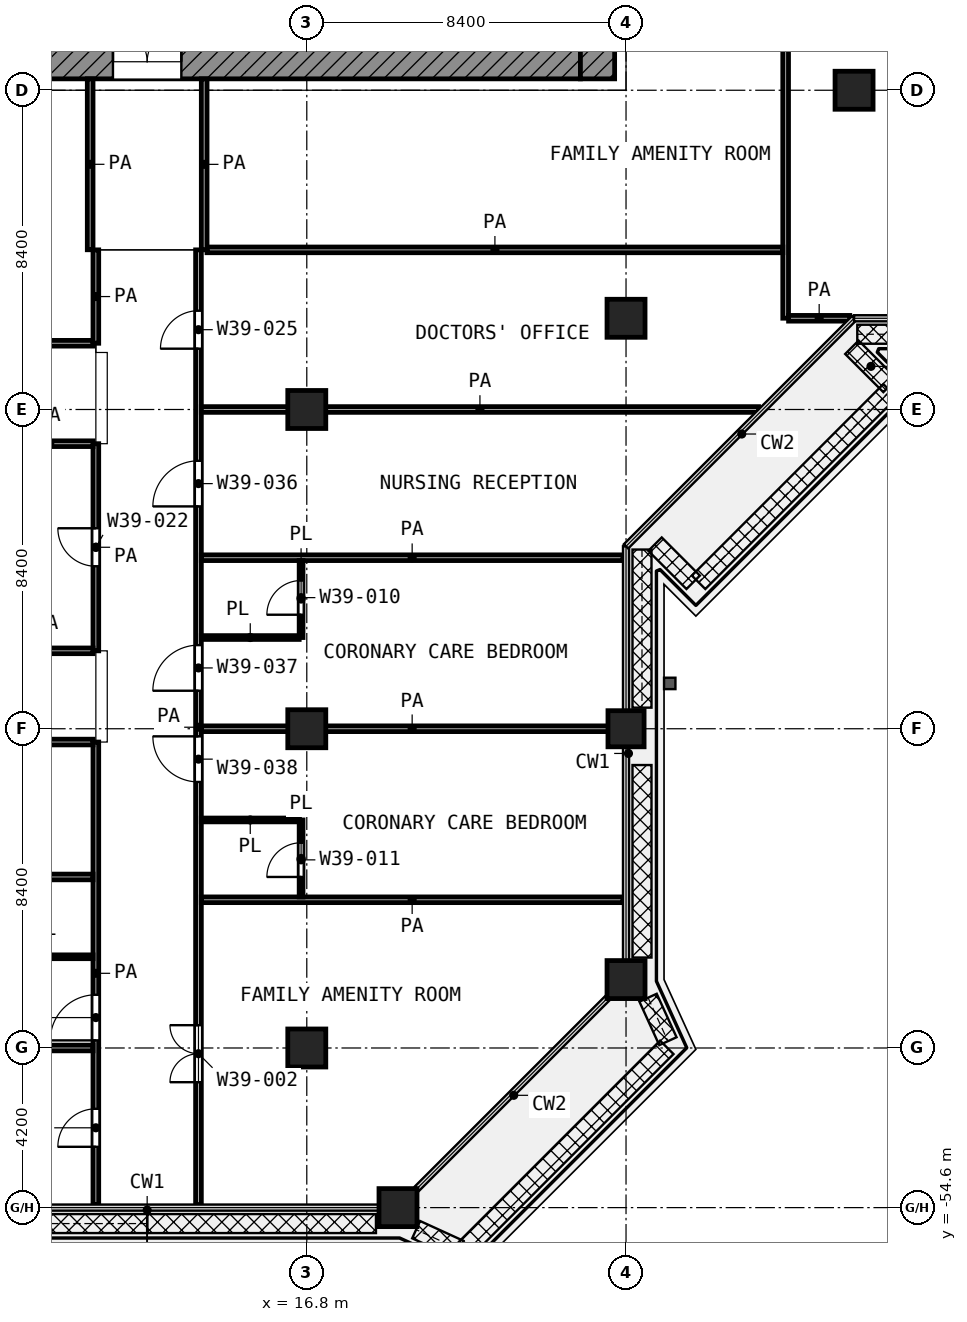
"""IFC4 building model, lengths in metres.
Left out: names, types, materials, properties, quantities, classifications, styles, units other than length and angle.
Written with IfcOpenShell. Run it as: python <this file> out.ifc"""

import sys

from ifc_helpers import new_model, si_unit, direction, frame, frame_2d, origin, origin_2d, place, context, subcontext, project, spatial, rectangle, extrude, element, fill, save


model = new_model("IFC4")
c1 = context("Model", 3, precision=1e-05, world=origin(), true_north=direction((0.0, 1.0)))
c2 = subcontext(c1, "Body", "Model", "MODEL_VIEW")
j1 = project(units=[si_unit("LENGTHUNIT", "METRE"), si_unit("PLANEANGLEUNIT", "RADIAN")], contexts=[c1])
p1 = place(None, origin())
s1 = spatial("IfcSite", under=j1, at=p1, CompositionType="ELEMENT")
p2 = place(p1, origin())
s2 = spatial("IfcBuilding", under=s1, at=p2, CompositionType="ELEMENT")
p3 = place(p2, frame((0.0, 0.0, 192.0)))
s3 = spatial("IfcBuildingStorey", under=s2, at=p3, CompositionType="ELEMENT", Elevation=192.0)
for number, where, z_axis, x_axis in (
    (1, (31.2, -25.2, 0.0), (0.0, 0.0, 1.0), (1.0, 0.0, 0.0)),
    (2, (25.2, -31.2, 0.0), (0.0, 0.0, 1.0), (1.0, 0.0, 0.0)),
    (3, (16.8, -33.6, 0.0), (0.0, 0.0, 1.0), (1.0, 0.0, 0.0)),
    (4, (16.8, -42.0, 0.0), (0.0, 0.0, 1.0), (1.0, 0.0, 0.0)),
):
    element("IfcColumn", number, at=place(p3, frame(where, z_axis=z_axis, x_axis=x_axis)), inside=s3, PredefinedType="COLUMN", context=c2, shape_type="SweptSolid", body=[
        extrude(rectangle(XDim=1.0, YDim=1.0, at=origin_2d()), origin(), (0.0, 0.0, 1.0), 4.2),
    ])
p4 = place(p3, frame((25.2, -42.0, 0.0), z_axis=(0.0, 0.0, 1.0), x_axis=(1.0, 0.0, 0.0)))
e5 = element("IfcColumn", 5, at=p4, inside=s3, PredefinedType="COLUMN", context=c2, shape_type="SweptSolid", body=[
    extrude(rectangle(XDim=0.95, YDim=0.95, at=origin_2d()), origin(), (0.0, 0.0, 1.0), 4.2),
])
for number, where, z_axis, x_axis in (
    (6, (25.2, -48.6, 0.0), (0.0, 0.0, 1.0), (1.0, 0.0, 0.0)),
    (7, (16.8, -50.4, 0.0), (0.0, 0.0, 1.0), (1.0, 0.0, 0.0)),
    (8, (19.2, -54.6, 0.0), (0.0, 0.0, 1.0), (1.0, 0.0, 0.0)),
):
    element("IfcColumn", number, at=place(p3, frame(where, z_axis=z_axis, x_axis=x_axis)), inside=s3, PredefinedType="COLUMN", context=c2, shape_type="SweptSolid", body=[
        extrude(rectangle(XDim=1.0, YDim=1.0, at=origin_2d()), origin(), (0.0, 0.0, 1.0), 4.2),
    ])
p5 = place(p3, frame((5.4, -24.45, 0.0), z_axis=(0.0, 0.0, 1.0), x_axis=(1.0, 0.0, 0.0)))
e9 = element("IfcWall", 9, at=p5, inside=s3, PredefinedType="SHEAR", context=c2, shape_type="SweptSolid", body=[
    extrude(rectangle(XDim=18.6, YDim=0.9, at=frame_2d((9.3, 0.0))), origin(), (0.0, 0.0, 1.0), 3.6),
])
p6 = place(p5, frame((6.3, 0.0, 0.0)))
e10 = element("IfcOpeningElement", 10, at=p6, cuts=e9, PredefinedType="OPENING", context=c2, shape_type="SweptSolid", body=[
    extrude(rectangle(XDim=1.8, YDim=2.1, at=frame_2d((0.9, 1.05))), frame((0.0, 0.46, 0.0), z_axis=(0.0, -1.0, 0.0), x_axis=(1.0, 0.0, 0.0)), (0.0, 0.0, 1.0), 0.92),
])
p7 = place(p3, frame((24.45, -24.9, 0.0), z_axis=(0.0, 0.0, 1.0), x_axis=(0.0, 1.0, 0.0)))
e11 = element("IfcWall", 11, at=p7, inside=s3, PredefinedType="SHEAR", context=c2, shape_type="SweptSolid", body=[
    extrude(rectangle(XDim=0.9, YDim=0.9, at=frame_2d((0.45, 0.0))), origin(), (0.0, 0.0, 1.0), 3.6),
])
p8 = place(p3, frame((8.6, -48.0, 0.0), z_axis=(0.0, 0.0, 1.0), x_axis=(1.0, 0.0, 0.0)))
e12 = element("IfcWall", 12, at=p8, inside=s3, PredefinedType="PARTITIONING", context=c2, shape_type="SweptSolid", body=[
    extrude(rectangle(XDim=2.575, YDim=0.1, at=frame_2d((1.288, 0.0))), origin(), (0.0, 0.0, 1.0), 3.6),
])
for number, where, z_axis, x_axis in (
    (13, (14.025, -44.4, 0.0), (0.0, 0.0, 1.0), (1.0, 0.0, 0.0)),
    (14, (14.025, -39.6, 0.0), (0.0, 0.0, 1.0), (1.0, 0.0, 0.0)),
):
    element("IfcWall", number, at=place(p3, frame(where, z_axis=z_axis, x_axis=x_axis)), inside=s3, PredefinedType="PARTITIONING", context=c2, shape_type="SweptSolid", body=[
        extrude(rectangle(XDim=2.575, YDim=0.1, at=frame_2d((1.288, 0.0))), origin(), (0.0, 0.0, 1.0), 3.6),
    ])
p9 = place(p3, frame((16.65, -46.425, 0.0), z_axis=(0.0, 0.0, 1.0), x_axis=(0.0, 1.0, 0.0)))
e15 = element("IfcWall", 15, at=p9, inside=s3, PredefinedType="PARTITIONING", context=c2, shape_type="SweptSolid", body=[
    extrude(rectangle(XDim=2.025, YDim=0.1, at=frame_2d((1.013, 0.0))), origin(), (0.0, 0.0, 1.0), 3.6),
])
p10 = place(p9, frame((0.525, 0.0, 0.0)))
e16 = element("IfcOpeningElement", 16, at=p10, cuts=e15, PredefinedType="OPENING", context=c2, shape_type="SweptSolid", body=[
    extrude(rectangle(XDim=0.9, YDim=2.1, at=frame_2d((0.45, 1.05))), frame((0.0, 0.06, 0.0), z_axis=(0.0, -1.0, 0.0), x_axis=(1.0, 0.0, 0.0)), (0.0, 0.0, 1.0), 0.12),
])
p11 = place(p3, frame((16.65, -39.6, 0.0), z_axis=(0.0, 0.0, 1.0), x_axis=(0.0, 1.0, 0.0)))
e17 = element("IfcWall", 17, at=p11, inside=s3, PredefinedType="PARTITIONING", context=c2, shape_type="SweptSolid", body=[
    extrude(rectangle(XDim=2.025, YDim=0.1, at=frame_2d((1.013, 0.0))), origin(), (0.0, 0.0, 1.0), 3.6),
])
p12 = place(p11, frame((0.6, 0.0, 0.0)))
e18 = element("IfcOpeningElement", 18, at=p12, cuts=e17, PredefinedType="OPENING", context=c2, shape_type="SweptSolid", body=[
    extrude(rectangle(XDim=0.9, YDim=2.1, at=frame_2d((0.45, 1.05))), frame((0.0, 0.06, 0.0), z_axis=(0.0, -1.0, 0.0), x_axis=(1.0, 0.0, 0.0)), (0.0, 0.0, 1.0), 0.12),
])
p13 = place(p3, frame((1.913, -50.4, 0.0), z_axis=(0.0, 0.0, 1.0), x_axis=(1.0, 0.0, 0.0)))
e19 = element("IfcWall", 19, at=p13, inside=s3, PredefinedType="PARTITIONING", context=c2, shape_type="SweptSolid", body=[
    extrude(rectangle(XDim=9.262, YDim=0.15, at=frame_2d((4.631, 0.0))), origin(), (0.0, 0.0, 1.0), 3.6),
])
p14 = place(p3, frame((14.025, -46.5, 0.0), z_axis=(0.0, 0.0, 1.0), x_axis=(1.0, 0.0, 0.0)))
e20 = element("IfcWall", 20, at=p14, inside=s3, PredefinedType="PARTITIONING", context=c2, shape_type="SweptSolid", body=[
    extrude(rectangle(XDim=11.095, YDim=0.15, at=frame_2d((5.548, 0.0))), origin(), (0.0, 0.0, 1.0), 3.6),
])
p15 = place(p3, frame((0.08, -45.9, 0.0), z_axis=(0.0, 0.0, 1.0), x_axis=(1.0, 0.0, 0.0)))
e21 = element("IfcWall", 21, at=p15, inside=s3, PredefinedType="PARTITIONING", context=c2, shape_type="SweptSolid", body=[
    extrude(rectangle(XDim=11.095, YDim=0.15, at=frame_2d((5.547, 0.0))), origin(), (0.0, 0.0, 1.0), 3.6),
])
p16 = place(p3, frame((2.327, -42.35, 0.0), z_axis=(0.0, 0.0, 1.0), x_axis=(1.0, 0.0, 0.0)))
e22 = element("IfcWall", 22, at=p16, inside=s3, PredefinedType="PARTITIONING", context=c2, shape_type="SweptSolid", body=[
    extrude(rectangle(XDim=8.848, YDim=0.15, at=frame_2d((4.424, 0.0))), origin(), (0.0, 0.0, 1.0), 3.6),
])
p17 = place(p16, frame((3.924, 0.0, 0.0)))
e23 = element("IfcOpeningElement", 23, at=p17, cuts=e22, PredefinedType="OPENING", context=c2, shape_type="SweptSolid", body=[
    extrude(rectangle(XDim=1.0, YDim=2.1, at=frame_2d((0.5, 1.05))), frame((0.0, 0.085, 0.0), z_axis=(0.0, -1.0, 0.0), x_axis=(1.0, 0.0, 0.0)), (0.0, 0.0, 1.0), 0.17),
])
p18 = place(p3, frame((14.025, -42.0, 0.0), z_axis=(0.0, 0.0, 1.0), x_axis=(1.0, 0.0, 0.0)))
e24 = element("IfcWall", 24, at=p18, inside=s3, PredefinedType="PARTITIONING", context=c2, shape_type="SweptSolid", body=[
    extrude(rectangle(XDim=11.095, YDim=0.15, at=frame_2d((5.548, 0.0))), origin(), (0.0, 0.0, 1.0), 3.6),
])
p19 = place(p3, frame((8.73, -39.95, 0.0), z_axis=(0.0, 0.0, 1.0), x_axis=(1.0, 0.0, 0.0)))
e25 = element("IfcWall", 25, at=p19, inside=s3, PredefinedType="PARTITIONING", context=c2, shape_type="SweptSolid", body=[
    extrude(rectangle(XDim=2.445, YDim=0.15, at=frame_2d((1.223, 0.0))), origin(), (0.0, 0.0, 1.0), 3.6),
])
p20 = place(p3, frame((14.025, -37.5, 0.0), z_axis=(0.0, 0.0, 1.0), x_axis=(1.0, 0.0, 0.0)))
e26 = element("IfcWall", 26, at=p20, inside=s3, PredefinedType="PARTITIONING", context=c2, shape_type="SweptSolid", body=[
    extrude(rectangle(XDim=11.095, YDim=0.15, at=frame_2d((5.548, 0.0))), origin(), (0.0, 0.0, 1.0), 3.6),
])
p21 = place(p3, frame((8.9, -34.5, 0.0), z_axis=(0.0, 0.0, 1.0), x_axis=(1.0, 0.0, 0.0)))
e27 = element("IfcWall", 27, at=p21, inside=s3, PredefinedType="PARTITIONING", context=c2, shape_type="SweptSolid", body=[
    extrude(rectangle(XDim=2.275, YDim=0.15, at=frame_2d((1.138, 0.0))), origin(), (0.0, 0.0, 1.0), 3.6),
])
p22 = place(p3, frame((14.025, -33.6, 0.0), z_axis=(0.0, 0.0, 1.0), x_axis=(1.0, 0.0, 0.0)))
e28 = element("IfcWall", 28, at=p22, inside=s3, PredefinedType="PARTITIONING", context=c2, shape_type="SweptSolid", body=[
    extrude(rectangle(XDim=14.662, YDim=0.15, at=frame_2d((7.331, 0.0))), origin(), (0.0, 0.0, 1.0), 3.6),
])
p23 = place(p3, frame((1.077, -31.857, 0.0), z_axis=(0.0, 0.0, 1.0), x_axis=(1.0, 0.0, 0.0)))
e29 = element("IfcWall", 29, at=p23, inside=s3, PredefinedType="PARTITIONING", context=c2, shape_type="SweptSolid", body=[
    extrude(rectangle(XDim=10.098, YDim=0.15, at=frame_2d((5.049, 0.0))), origin(), (0.0, 0.0, 1.0), 3.6),
])
p24 = place(p23, frame((4.449, 0.0, 0.0)))
e30 = element("IfcOpeningElement", 30, at=p24, cuts=e29, PredefinedType="OPENING", context=c2, shape_type="SweptSolid", body=[
    extrude(rectangle(XDim=1.2, YDim=2.1, at=frame_2d((0.6, 1.05))), frame((0.0, 0.085, 0.0), z_axis=(0.0, -1.0, 0.0), x_axis=(1.0, 0.0, 0.0)), (0.0, 0.0, 1.0), 0.17),
])
p25 = place(p3, frame((29.477, -31.2, 0.0), z_axis=(0.0, 0.0, 1.0), x_axis=(1.0, 0.0, 0.0)))
e31 = element("IfcWall", 31, at=p25, inside=s3, PredefinedType="PARTITIONING", context=c2, shape_type="SweptSolid", body=[
    extrude(rectangle(XDim=1.61, YDim=0.15, at=frame_2d((0.805, 0.0))), origin(), (0.0, 0.0, 1.0), 3.6),
])
p26 = place(p3, frame((14.175, -29.4, 0.0), z_axis=(0.0, 0.0, 1.0), x_axis=(1.0, 0.0, 0.0)))
e32 = element("IfcWall", 32, at=p26, inside=s3, PredefinedType="PARTITIONING", context=c2, shape_type="SweptSolid", body=[
    extrude(rectangle(XDim=15.15, YDim=0.15, at=frame_2d((7.575, 0.0))), origin(), (0.0, 0.0, 1.0), 3.6),
])
p27 = place(p3, frame((11.1, -29.397, 0.0), z_axis=(0.0, 0.0, 1.0), x_axis=(0.0, 1.0, 0.0)))
e33 = element("IfcWall", 33, at=p27, inside=s3, PredefinedType="PARTITIONING", context=c2, shape_type="SweptSolid", body=[
    extrude(rectangle(XDim=4.497, YDim=0.15, at=frame_2d((2.249, 0.0))), origin(), (0.0, 0.0, 1.0), 3.6),
])
p28 = place(p3, frame((11.25, -54.52, 0.0), z_axis=(0.0, 0.0, 1.0), x_axis=(0.0, 1.0, 0.0)))
e34 = element("IfcWall", 34, at=p28, inside=s3, PredefinedType="PARTITIONING", context=c2, shape_type="SweptSolid", body=[
    extrude(rectangle(XDim=12.17, YDim=0.15, at=frame_2d((6.085, 0.0))), origin(), (0.0, 0.0, 1.0), 3.6),
])
p29 = place(p28, frame((4.32, 0.0, 0.0)))
e35 = element("IfcOpeningElement", 35, at=p29, cuts=e34, PredefinedType="OPENING", context=c2, shape_type="SweptSolid", body=[
    extrude(rectangle(XDim=1.2, YDim=2.1, at=frame_2d((0.6, 1.05))), frame((0.0, 0.085, 0.0), z_axis=(0.0, -1.0, 0.0), x_axis=(1.0, 0.0, 0.0)), (0.0, 0.0, 1.0), 0.17),
])
p30 = place(p28, frame((1.52, 0.0, 0.0)))
e36 = element("IfcOpeningElement", 36, at=p30, cuts=e34, PredefinedType="OPENING", context=c2, shape_type="SweptSolid", body=[
    extrude(rectangle(XDim=1.0, YDim=2.1, at=frame_2d((0.5, 1.05))), frame((0.0, 0.085, 0.0), z_axis=(0.0, -1.0, 0.0), x_axis=(1.0, 0.0, 0.0)), (0.0, 0.0, 1.0), 0.17),
])
p31 = place(p3, frame((11.25, -39.95, 0.0), z_axis=(0.0, 0.0, 1.0), x_axis=(0.0, 1.0, 0.0)))
e37 = element("IfcWall", 37, at=p31, inside=s3, PredefinedType="PARTITIONING", context=c2, shape_type="SweptSolid", body=[
    extrude(rectangle(XDim=5.45, YDim=0.15, at=frame_2d((2.725, 0.0))), origin(), (0.0, 0.0, 1.0), 3.6),
])
p32 = place(p31, frame((2.225, 0.0, 0.0)))
e38 = element("IfcOpeningElement", 38, at=p32, cuts=e37, PredefinedType="OPENING", context=c2, shape_type="SweptSolid", body=[
    extrude(rectangle(XDim=1.0, YDim=2.1, at=frame_2d((0.5, 1.05))), frame((0.0, 0.085, 0.0), z_axis=(0.0, -1.0, 0.0), x_axis=(1.0, 0.0, 0.0)), (0.0, 0.0, 1.0), 0.17),
])
p33 = place(p3, frame((11.25, -31.857, 0.0), z_axis=(0.0, 0.0, 1.0), x_axis=(0.0, 1.0, 0.0)))
e39 = element("IfcWall", 39, at=p33, inside=s3, PredefinedType="PARTITIONING", context=c2, shape_type="SweptSolid", body=[
    extrude(rectangle(XDim=2.457, YDim=0.15, at=frame_2d((1.229, 0.0))), origin(), (0.0, 0.0, 1.0), 3.6),
])
p34 = place(p3, frame((13.95, -54.52, 0.0), z_axis=(0.0, 0.0, 1.0), x_axis=(0.0, 1.0, 0.0)))
e40 = element("IfcWall", 40, at=p34, inside=s3, PredefinedType="PARTITIONING", context=c2, shape_type="SweptSolid", body=[
    extrude(rectangle(XDim=25.12, YDim=0.15, at=frame_2d((12.56, 0.0))), origin(), (0.0, 0.0, 1.0), 3.6),
])
p35 = place(p34, frame((22.52, 0.0, 0.0)))
e41 = element("IfcOpeningElement", 41, at=p35, cuts=e40, PredefinedType="OPENING", context=c2, shape_type="SweptSolid", body=[
    extrude(rectangle(XDim=1.0, YDim=2.1, at=frame_2d((0.5, 1.05))), frame((0.0, 0.085, 0.0), z_axis=(0.0, -1.0, 0.0), x_axis=(1.0, 0.0, 0.0)), (0.0, 0.0, 1.0), 0.17),
])
p36 = place(p34, frame((18.37, 0.0, 0.0)))
e42 = element("IfcOpeningElement", 42, at=p36, cuts=e40, PredefinedType="OPENING", context=c2, shape_type="SweptSolid", body=[
    extrude(rectangle(XDim=1.2, YDim=2.1, at=frame_2d((0.6, 1.05))), frame((0.0, 0.085, 0.0), z_axis=(0.0, -1.0, 0.0), x_axis=(1.0, 0.0, 0.0)), (0.0, 0.0, 1.0), 0.17),
])
p37 = place(p34, frame((13.52, 0.0, 0.0)))
e43 = element("IfcOpeningElement", 43, at=p37, cuts=e40, PredefinedType="OPENING", context=c2, shape_type="SweptSolid", body=[
    extrude(rectangle(XDim=1.2, YDim=2.1, at=frame_2d((0.6, 1.05))), frame((0.0, 0.085, 0.0), z_axis=(0.0, -1.0, 0.0), x_axis=(1.0, 0.0, 0.0)), (0.0, 0.0, 1.0), 0.17),
])
p38 = place(p34, frame((11.12, 0.0, 0.0)))
e44 = element("IfcOpeningElement", 44, at=p38, cuts=e40, PredefinedType="OPENING", context=c2, shape_type="SweptSolid", body=[
    extrude(rectangle(XDim=1.2, YDim=2.1, at=frame_2d((0.6, 1.05))), frame((0.0, 0.085, 0.0), z_axis=(0.0, -1.0, 0.0), x_axis=(1.0, 0.0, 0.0)), (0.0, 0.0, 1.0), 0.17),
])
p39 = place(p34, frame((3.22, 0.0, 0.0)))
e45 = element("IfcOpeningElement", 45, at=p39, cuts=e40, PredefinedType="OPENING", context=c2, shape_type="SweptSolid", body=[
    extrude(rectangle(XDim=1.5, YDim=2.1, at=frame_2d((0.75, 1.05))), frame((0.0, 0.085, 0.0), z_axis=(0.0, -1.0, 0.0), x_axis=(1.0, 0.0, 0.0)), (0.0, 0.0, 1.0), 0.17),
])
p40 = place(p3, frame((14.1, -29.4, 0.0), z_axis=(0.0, 0.0, 1.0), x_axis=(0.0, 1.0, 0.0)))
e46 = element("IfcWall", 46, at=p40, inside=s3, PredefinedType="PARTITIONING", context=c2, shape_type="SweptSolid", body=[
    extrude(rectangle(XDim=4.5, YDim=0.15, at=frame_2d((2.25, 0.0))), origin(), (0.0, 0.0, 1.0), 3.6),
])
p41 = place(p3, frame((29.4, -31.198, 0.0), z_axis=(0.0, 0.0, 1.0), x_axis=(0.0, 1.0, 0.0)))
e47 = element("IfcWall", 47, at=p41, inside=s3, PredefinedType="PARTITIONING", context=c2, shape_type="SweptSolid", body=[
    extrude(rectangle(XDim=17.098, YDim=0.15, at=frame_2d((8.549, 0.0))), origin(), (0.0, 0.0, 1.0), 3.6),
])
p42 = place(p6, origin())
e48 = element("IfcDoor", 48, at=p42, inside=s3, OperationType="DOUBLE_DOOR_SINGLE_SWING", PredefinedType="DOOR", context=c2, shape_type="SweptSolid", body=[
    extrude(rectangle(XDim=1.8, YDim=2.1, at=frame_2d((0.9, 1.05))), frame((0.0, 0.025, 0.0), z_axis=(0.0, -1.0, 0.0), x_axis=(1.0, 0.0, 0.0)), (0.0, 0.0, 1.0), 0.05),
])
fill(e10, e48)
p43 = place(p32, origin())
e49 = element("IfcDoor", 49, at=p43, inside=s3, OperationType="SINGLE_SWING_RIGHT", PredefinedType="DOOR", context=c2, shape_type="SweptSolid", body=[
    extrude(rectangle(XDim=1.0, YDim=2.1, at=frame_2d((0.5, 1.05))), frame((0.0, 0.025, 0.0), z_axis=(0.0, -1.0, 0.0), x_axis=(1.0, 0.0, 0.0)), (0.0, 0.0, 1.0), 0.05),
])
fill(e38, e49)
p44 = place(p29, origin())
e50 = element("IfcDoor", 50, at=p44, inside=s3, OperationType="SINGLE_SWING_LEFT", PredefinedType="DOOR", context=c2, shape_type="SweptSolid", body=[
    extrude(rectangle(XDim=1.2, YDim=2.1, at=frame_2d((0.6, 1.05))), frame((0.0, 0.025, 0.0), z_axis=(0.0, -1.0, 0.0), x_axis=(1.0, 0.0, 0.0)), (0.0, 0.0, 1.0), 0.05),
])
fill(e35, e50)
p45 = place(p30, origin())
e51 = element("IfcDoor", 51, at=p45, inside=s3, OperationType="SINGLE_SWING_LEFT", PredefinedType="DOOR", context=c2, shape_type="SweptSolid", body=[
    extrude(rectangle(XDim=1.0, YDim=2.1, at=frame_2d((0.5, 1.05))), frame((0.0, 0.025, 0.0), z_axis=(0.0, -1.0, 0.0), x_axis=(1.0, 0.0, 0.0)), (0.0, 0.0, 1.0), 0.05),
])
fill(e36, e51)
p46 = place(p35, origin())
e52 = element("IfcDoor", 52, at=p46, inside=s3, OperationType="SINGLE_SWING_LEFT", PredefinedType="DOOR", context=c2, shape_type="SweptSolid", body=[
    extrude(rectangle(XDim=1.0, YDim=2.1, at=frame_2d((0.5, 1.05))), frame((0.0, 0.025, 0.0), z_axis=(0.0, -1.0, 0.0), x_axis=(1.0, 0.0, 0.0)), (0.0, 0.0, 1.0), 0.05),
])
fill(e41, e52)
p47 = place(p36, origin())
e53 = element("IfcDoor", 53, at=p47, inside=s3, OperationType="SINGLE_SWING_LEFT", PredefinedType="DOOR", context=c2, shape_type="SweptSolid", body=[
    extrude(rectangle(XDim=1.2, YDim=2.1, at=frame_2d((0.6, 1.05))), frame((0.0, 0.025, 0.0), z_axis=(0.0, -1.0, 0.0), x_axis=(1.0, 0.0, 0.0)), (0.0, 0.0, 1.0), 0.05),
])
fill(e42, e53)
p48 = place(p37, origin())
e54 = element("IfcDoor", 54, at=p48, inside=s3, OperationType="SINGLE_SWING_LEFT", PredefinedType="DOOR", context=c2, shape_type="SweptSolid", body=[
    extrude(rectangle(XDim=1.2, YDim=2.1, at=frame_2d((0.6, 1.05))), frame((0.0, 0.025, 0.0), z_axis=(0.0, -1.0, 0.0), x_axis=(1.0, 0.0, 0.0)), (0.0, 0.0, 1.0), 0.05),
])
fill(e43, e54)
p49 = place(p12, origin())
e55 = element("IfcDoor", 55, at=p49, inside=s3, OperationType="SINGLE_SWING_LEFT", PredefinedType="DOOR", context=c2, shape_type="SweptSolid", body=[
    extrude(rectangle(XDim=0.9, YDim=2.1, at=frame_2d((0.45, 1.05))), frame((0.0, 0.025, 0.0), z_axis=(0.0, -1.0, 0.0), x_axis=(1.0, 0.0, 0.0)), (0.0, 0.0, 1.0), 0.05),
])
fill(e18, e55)
p50 = place(p38, origin())
e56 = element("IfcDoor", 56, at=p50, inside=s3, OperationType="SINGLE_SWING_RIGHT", PredefinedType="DOOR", context=c2, shape_type="SweptSolid", body=[
    extrude(rectangle(XDim=1.2, YDim=2.1, at=frame_2d((0.6, 1.05))), frame((0.0, 0.025, 0.0), z_axis=(0.0, -1.0, 0.0), x_axis=(1.0, 0.0, 0.0)), (0.0, 0.0, 1.0), 0.05),
])
fill(e44, e56)
p51 = place(p10, origin())
e57 = element("IfcDoor", 57, at=p51, inside=s3, OperationType="SINGLE_SWING_LEFT", PredefinedType="DOOR", context=c2, shape_type="SweptSolid", body=[
    extrude(rectangle(XDim=0.9, YDim=2.1, at=frame_2d((0.45, 1.05))), frame((0.0, 0.025, 0.0), z_axis=(0.0, -1.0, 0.0), x_axis=(1.0, 0.0, 0.0)), (0.0, 0.0, 1.0), 0.05),
])
fill(e16, e57)
p52 = place(p39, origin())
e58 = element("IfcDoor", 58, at=p52, inside=s3, OperationType="DOUBLE_DOOR_SINGLE_SWING", PredefinedType="DOOR", context=c2, shape_type="SweptSolid", body=[
    extrude(rectangle(XDim=1.5, YDim=2.1, at=frame_2d((0.75, 1.05))), frame((0.0, 0.025, 0.0), z_axis=(0.0, -1.0, 0.0), x_axis=(1.0, 0.0, 0.0)), (0.0, 0.0, 1.0), 0.05),
])
fill(e45, e58)
save(model, sys.argv[1])
